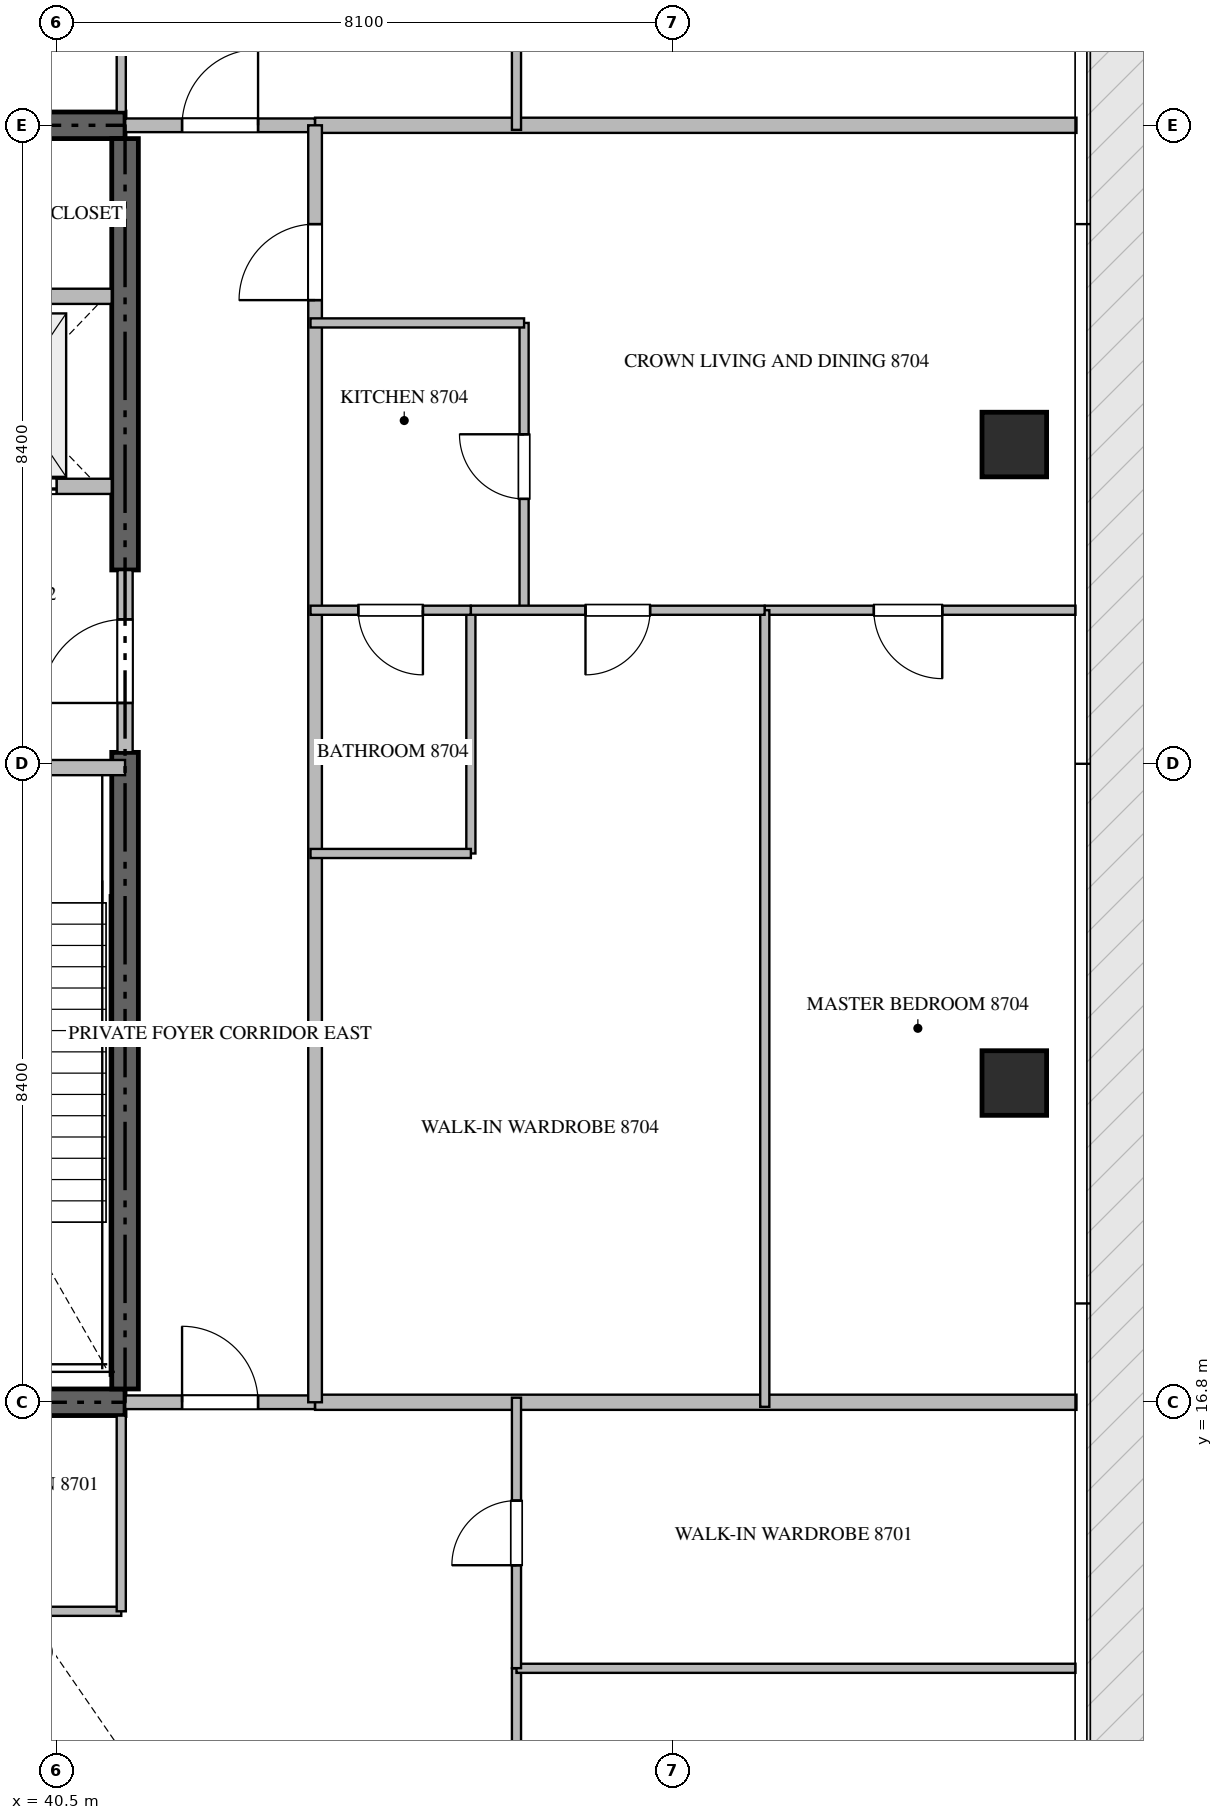
"""IFC4 building model, lengths in metres.
Left out: names, types, materials, properties, quantities, classifications, styles, units other than length and angle.
Written with IfcOpenShell. Run it as: python <this file> out.ifc"""

import sys

from ifc_helpers import new_model, si_unit, direction, frame, frame_2d, origin, origin_2d, place, context, subcontext, project, spatial, rectangle, extrude, source, transform, mapped, element, fill, save


model = new_model("IFC4")
c1 = context("Model", 3, precision=1e-05, world=origin(), true_north=direction((0.0, 1.0)))
c2 = subcontext(c1, "Body", "Model", "MODEL_VIEW")
j1 = project(units=[si_unit("LENGTHUNIT", "METRE"), si_unit("PLANEANGLEUNIT", "RADIAN")], contexts=[c1])
p1 = place(None, origin())
s1 = spatial("IfcSite", under=j1, at=p1, CompositionType="ELEMENT")
p2 = place(p1, origin())
s2 = spatial("IfcBuilding", under=s1, at=p2, CompositionType="ELEMENT")
p3 = place(p2, frame((0.0, 0.0, 353.85)))
s3 = spatial("IfcBuildingStorey", under=s2, at=p3, CompositionType="ELEMENT", Elevation=353.85)
for number, where, z_axis, x_axis in (
    (1, (23.4, 16.8, -0.26), (0.0, 0.0, 1.0), (1.0, 0.0, 0.0)),
    (2, (41.4, 33.6, -0.26), (0.0, 0.0, 1.0), (-1.0, 0.0, 0.0)),
):
    element("IfcWall", number, at=place(p3, frame(where, z_axis=z_axis, x_axis=x_axis)), inside=s3, PredefinedType="SHEAR", context=c2, shape_type="SweptSolid", body=[
        extrude(rectangle(XDim=18.0, YDim=0.35, at=frame_2d((9.0, 0.0))), origin(), (0.0, 0.0, 1.0), 5.798),
    ])
p4 = place(p3, frame((41.4, 16.975, -0.26), z_axis=(0.0, 0.0, 1.0), x_axis=(0.0, 1.0, 0.0)))
e3 = element("IfcWall", 3, at=p4, inside=s3, PredefinedType="SHEAR", context=c2, shape_type="SweptSolid", body=[
    extrude(rectangle(XDim=8.375, YDim=0.35, at=frame_2d((4.188, 0.0))), origin(), (0.0, 0.0, 1.0), 5.798),
])
p5 = place(p3, frame((41.4, 27.75, -0.26), z_axis=(0.0, 0.0, 1.0), x_axis=(0.0, 1.0, 0.0)))
e4 = element("IfcWall", 4, at=p5, inside=s3, PredefinedType="SHEAR", context=c2, shape_type="SweptSolid", body=[
    extrude(rectangle(XDim=5.675, YDim=0.35, at=frame_2d((2.837, 0.0))), origin(), (0.0, 0.0, 1.0), 5.798),
])
m1 = source(origin(), c2, "Body", "SweptSolid", [
    extrude(rectangle(XDim=0.85, YDim=0.85, at=origin_2d()), origin(), (0.0, 0.0, 1.0), 5.8),
])
for number, where, z_axis, x_axis in (
    (5, (53.1, 21.0, -0.26), (0.0, 0.0, 1.0), (1.0, 0.0, 0.0)),
    (6, (53.1, 29.4, -0.26), (0.0, 0.0, 1.0), (1.0, 0.0, 0.0)),
):
    element("IfcColumn", number, at=place(p3, frame(where, z_axis=z_axis, x_axis=x_axis)), inside=s3, PredefinedType="COLUMN", context=c2, shape_type="MappedRepresentation", body=[
        mapped(m1, transform((0.0, 0.0, 0.0), scale=1.0)),
    ])
p6 = place(p3, frame((36.95, 25.15, 0.0), z_axis=(0.0, 0.0, 1.0), x_axis=(1.0, 0.0, 0.0)))
e7 = element("IfcWall", 7, at=p6, inside=s3, PredefinedType="STANDARD", context=c2, shape_type="SweptSolid", body=[
    extrude(rectangle(XDim=4.45, YDim=0.2, at=frame_2d((2.225, 0.0))), origin(), (0.0, 0.0, 1.0), 5.54),
])
p7 = place(p6, frame((1.65, 0.0, 0.0)))
e8 = element("IfcOpeningElement", 8, at=p7, cuts=e7, PredefinedType="OPENING", context=c2, shape_type="SweptSolid", body=[
    extrude(rectangle(XDim=1.1, YDim=2.15, at=frame_2d((0.55, 1.075))), frame((0.0, 0.11, 0.0), z_axis=(0.0, -1.0, 0.0), x_axis=(1.0, 0.0, 0.0)), (0.0, 0.0, 1.0), 0.22),
])
p8 = place(p3, frame((38.75, 28.85, 0.0), z_axis=(0.0, 0.0, 1.0), x_axis=(1.0, 0.0, 0.0)))
e9 = element("IfcWall", 9, at=p8, inside=s3, PredefinedType="STANDARD", context=c2, shape_type="SweptSolid", body=[
    extrude(rectangle(XDim=2.475, YDim=0.2, at=frame_2d((1.238, 0.0))), origin(), (0.0, 0.0, 1.0), 5.54),
])
p9 = place(p8, frame((0.55, 0.0, 0.0)))
e10 = element("IfcOpeningElement", 10, at=p9, cuts=e9, PredefinedType="OPENING", context=c2, shape_type="SweptSolid", body=[
    extrude(rectangle(XDim=1.2, YDim=2.2, at=frame_2d((0.6, 1.1))), frame((0.0, 0.11, 0.0), z_axis=(0.0, -1.0, 0.0), x_axis=(1.0, 0.0, 0.0)), (0.0, 0.0, 1.0), 0.22),
])
p10 = place(p3, frame((38.75, 31.35, 0.0), z_axis=(0.0, 0.0, 1.0), x_axis=(1.0, 0.0, 0.0)))
e11 = element("IfcWall", 11, at=p10, inside=s3, PredefinedType="STANDARD", context=c2, shape_type="SweptSolid", body=[
    extrude(rectangle(XDim=2.475, YDim=0.2, at=frame_2d((1.238, 0.0))), origin(), (0.0, 0.0, 1.0), 5.54),
])
p11 = place(p3, frame((41.4, 25.352, 0.0), z_axis=(0.0, 0.0, 1.0), x_axis=(0.0, 1.0, 0.0)))
e12 = element("IfcWall", 12, at=p11, inside=s3, PredefinedType="STANDARD", context=c2, shape_type="SweptSolid", body=[
    extrude(rectangle(XDim=2.396, YDim=0.2, at=frame_2d((1.198, 0.0))), origin(), (0.0, 0.0, 1.0), 5.54),
])
p12 = place(p11, frame((0.648, 0.0, 0.0)))
e13 = element("IfcOpeningElement", 13, at=p12, cuts=e12, PredefinedType="OPENING", context=c2, shape_type="SweptSolid", body=[
    extrude(rectangle(XDim=1.1, YDim=2.15, at=frame_2d((0.55, 1.075))), frame((0.0, 0.11, 0.0), z_axis=(0.0, -1.0, 0.0), x_axis=(1.0, 0.0, 0.0)), (0.0, 0.0, 1.0), 0.22),
])
for number, where, z_axis, x_axis in (
    (14, (43.9, 16.8, 0.0), (0.0, 0.0, 1.0), (1.0, 0.0, 0.0)),
    (15, (43.9, 33.6, 0.0), (0.0, 0.0, 1.0), (1.0, 0.0, 0.0)),
):
    element("IfcWall", number, at=place(p3, frame(where, z_axis=z_axis, x_axis=x_axis)), inside=s3, PredefinedType="PARTITIONING", context=c2, shape_type="SweptSolid", body=[
        extrude(rectangle(XDim=10.018, YDim=0.2, at=frame_2d((5.009, 0.0))), origin(), (0.0, 0.0, 1.0), 5.54),
    ])
p13 = place(p3, frame((41.402, 16.8, 0.0), z_axis=(0.0, 0.0, 1.0), x_axis=(1.0, 0.0, 0.0)))
e16 = element("IfcWall", 16, at=p13, inside=s3, PredefinedType="PARTITIONING", context=c2, shape_type="SweptSolid", body=[
    extrude(rectangle(XDim=2.496, YDim=0.18, at=frame_2d((1.248, 0.0))), origin(), (0.0, 0.0, 1.0), 5.54),
])
p14 = place(p13, frame((0.748, 0.0, 0.0)))
e17 = element("IfcOpeningElement", 17, at=p14, cuts=e16, PredefinedType="OPENING", context=c2, shape_type="SweptSolid", body=[
    extrude(rectangle(XDim=1.0, YDim=2.15, at=frame_2d((0.5, 1.075))), frame((0.0, 0.1, 0.0), z_axis=(0.0, -1.0, 0.0), x_axis=(1.0, 0.0, 0.0)), (0.0, 0.0, 1.0), 0.2),
])
p15 = place(p3, frame((41.402, 33.6, 0.0), z_axis=(0.0, 0.0, 1.0), x_axis=(1.0, 0.0, 0.0)))
e18 = element("IfcWall", 18, at=p15, inside=s3, PredefinedType="PARTITIONING", context=c2, shape_type="SweptSolid", body=[
    extrude(rectangle(XDim=2.496, YDim=0.18, at=frame_2d((1.248, 0.0))), origin(), (0.0, 0.0, 1.0), 5.54),
])
p16 = place(p15, frame((0.748, 0.0, 0.0)))
e19 = element("IfcOpeningElement", 19, at=p16, cuts=e18, PredefinedType="OPENING", context=c2, shape_type="SweptSolid", body=[
    extrude(rectangle(XDim=1.0, YDim=2.15, at=frame_2d((0.5, 1.075))), frame((0.0, 0.1, 0.0), z_axis=(0.0, -1.0, 0.0), x_axis=(1.0, 0.0, 0.0)), (0.0, 0.0, 1.0), 0.2),
])
p17 = place(p3, frame((43.9, 16.8, 0.0), z_axis=(0.0, 0.0, 1.0), x_axis=(0.0, 1.0, 0.0)))
e20 = element("IfcWall", 20, at=p17, inside=s3, PredefinedType="PARTITIONING", context=c2, shape_type="SweptSolid", body=[
    extrude(rectangle(XDim=16.8, YDim=0.18, at=frame_2d((8.4, 0.0))), origin(), (0.0, 0.0, 1.0), 5.54),
])
p18 = place(p17, frame((14.5, 0.0, 0.0)))
e21 = element("IfcOpeningElement", 21, at=p18, cuts=e20, PredefinedType="OPENING", context=c2, shape_type="SweptSolid", body=[
    extrude(rectangle(XDim=1.0, YDim=2.15, at=frame_2d((0.5, 1.075))), frame((0.0, 0.1, 0.0), z_axis=(0.0, -1.0, 0.0), x_axis=(1.0, 0.0, 0.0)), (0.0, 0.0, 1.0), 0.2),
])
p19 = place(p3, frame((38.5, 14.05, 0.0), z_axis=(0.0, 0.0, 1.0), x_axis=(1.0, 0.0, 0.0)))
e22 = element("IfcWall", 22, at=p19, inside=s3, PredefinedType="PARTITIONING", context=c2, shape_type="SweptSolid", body=[
    extrude(rectangle(XDim=2.85, YDim=0.12, at=frame_2d((1.425, 0.0))), origin(), (0.0, 0.0, 1.0), 5.54),
])
p20 = place(p19, frame((1.0, 0.0, 0.0)))
e23 = element("IfcOpeningElement", 23, at=p20, cuts=e22, PredefinedType="OPENING", context=c2, shape_type="SweptSolid", body=[
    extrude(rectangle(XDim=0.85, YDim=2.1, at=frame_2d((0.425, 1.05))), frame((0.0, 0.07, 0.0), z_axis=(0.0, -1.0, 0.0), x_axis=(1.0, 0.0, 0.0)), (0.0, 0.0, 1.0), 0.14),
])
p21 = place(p3, frame((41.35, 14.05, 0.0), z_axis=(0.0, 0.0, 1.0), x_axis=(0.0, 1.0, 0.0)))
e24 = element("IfcWall", 24, at=p21, inside=s3, PredefinedType="PARTITIONING", context=c2, shape_type="SweptSolid", body=[
    extrude(rectangle(XDim=2.575, YDim=0.12, at=frame_2d((1.288, 0.0))), origin(), (0.0, 0.0, 1.0), 5.54),
])
p22 = place(p3, frame((46.55, 4.095, 0.0), z_axis=(0.0, 0.0, 1.0), x_axis=(0.0, 1.0, 0.0)))
e25 = element("IfcWall", 25, at=p22, inside=s3, PredefinedType="PARTITIONING", context=c2, shape_type="SweptSolid", body=[
    extrude(rectangle(XDim=9.205, YDim=0.12, at=frame_2d((4.603, 0.0))), origin(), (0.0, 0.0, 1.0), 5.54),
])
p23 = place(p22, frame((4.568, 0.0, 0.0)))
e26 = element("IfcOpeningElement", 26, at=p23, cuts=e25, PredefinedType="OPENING", context=c2, shape_type="SweptSolid", body=[
    extrude(rectangle(XDim=0.9, YDim=2.1, at=frame_2d((0.45, 1.05))), frame((0.0, 0.07, 0.0), z_axis=(0.0, -1.0, 0.0), x_axis=(1.0, 0.0, 0.0)), (0.0, 0.0, 1.0), 0.14),
])
p24 = place(p3, frame((46.55, 13.3, 0.0), z_axis=(0.0, 0.0, 1.0), x_axis=(1.0, 0.0, 0.0)))
e27 = element("IfcWall", 27, at=p24, inside=s3, PredefinedType="PARTITIONING", context=c2, shape_type="SweptSolid", body=[
    extrude(rectangle(XDim=7.355, YDim=0.12, at=frame_2d((3.677, 0.0))), origin(), (0.0, 0.0, 1.0), 5.54),
])
p25 = place(p3, frame((46.55, 13.302, 0.0), z_axis=(0.0, 0.0, 1.0), x_axis=(0.0, 1.0, 0.0)))
e28 = element("IfcWall", 28, at=p25, inside=s3, PredefinedType="PARTITIONING", context=c2, shape_type="SweptSolid", body=[
    extrude(rectangle(XDim=3.558, YDim=0.12, at=frame_2d((1.779, 0.0))), origin(), (0.0, 0.0, 1.0), 5.54),
])
p26 = place(p25, frame((1.354, 0.0, 0.0)))
e29 = element("IfcOpeningElement", 29, at=p26, cuts=e28, PredefinedType="OPENING", context=c2, shape_type="SweptSolid", body=[
    extrude(rectangle(XDim=0.85, YDim=2.1, at=frame_2d((0.425, 1.05))), frame((0.0, 0.07, 0.0), z_axis=(0.0, -1.0, 0.0), x_axis=(1.0, 0.0, 0.0)), (0.0, 0.0, 1.0), 0.14),
])
p27 = place(p3, frame((41.35, 36.35, 0.0), z_axis=(0.0, 0.0, 1.0), x_axis=(0.0, -1.0, 0.0)))
e30 = element("IfcWall", 30, at=p27, inside=s3, PredefinedType="PARTITIONING", context=c2, shape_type="SweptSolid", body=[
    extrude(rectangle(XDim=2.575, YDim=0.12, at=frame_2d((1.288, 0.0))), origin(), (0.0, 0.0, 1.0), 5.54),
])
p28 = place(p3, frame((46.55, 37.098, 0.0), z_axis=(0.0, 0.0, 1.0), x_axis=(0.0, -1.0, 0.0)))
e31 = element("IfcWall", 31, at=p28, inside=s3, PredefinedType="PARTITIONING", context=c2, shape_type="SweptSolid", body=[
    extrude(rectangle(XDim=3.558, YDim=0.12, at=frame_2d((1.779, 0.0))), origin(), (0.0, 0.0, 1.0), 5.54),
])
p29 = place(p28, frame((1.354, 0.0, 0.0)))
e32 = element("IfcOpeningElement", 32, at=p29, cuts=e31, PredefinedType="OPENING", context=c2, shape_type="SweptSolid", body=[
    extrude(rectangle(XDim=0.85, YDim=2.1, at=frame_2d((0.425, 1.05))), frame((0.0, 0.07, 0.0), z_axis=(0.0, -1.0, 0.0), x_axis=(1.0, 0.0, 0.0)), (0.0, 0.0, 1.0), 0.14),
])
p30 = place(p3, frame((46.65, 27.22, 0.0), z_axis=(0.0, 0.0, 1.0), x_axis=(0.0, 1.0, 0.0)))
e33 = element("IfcWall", 33, at=p30, inside=s3, PredefinedType="PARTITIONING", context=c2, shape_type="SweptSolid", body=[
    extrude(rectangle(XDim=3.78, YDim=0.12, at=frame_2d((1.89, 0.0))), origin(), (0.0, 0.0, 1.0), 5.54),
])
p31 = place(p30, frame((1.465, 0.0, 0.0)))
e34 = element("IfcOpeningElement", 34, at=p31, cuts=e33, PredefinedType="OPENING", context=c2, shape_type="SweptSolid", body=[
    extrude(rectangle(XDim=0.85, YDim=2.1, at=frame_2d((0.425, 1.05))), frame((0.0, 0.07, 0.0), z_axis=(0.0, -1.0, 0.0), x_axis=(1.0, 0.0, 0.0)), (0.0, 0.0, 1.0), 0.14),
])
p32 = place(p3, frame((46.65, 31.0, 0.0), z_axis=(0.0, 0.0, 1.0), x_axis=(-1.0, 0.0, 0.0)))
e35 = element("IfcWall", 35, at=p32, inside=s3, PredefinedType="PARTITIONING", context=c2, shape_type="SweptSolid", body=[
    extrude(rectangle(XDim=2.81, YDim=0.12, at=frame_2d((1.405, 0.0))), origin(), (0.0, 0.0, 1.0), 5.54),
])
p33 = place(p3, frame((53.905, 27.22, 0.0), z_axis=(0.0, 0.0, 1.0), x_axis=(-1.0, 0.0, 0.0)))
e36 = element("IfcWall", 36, at=p33, inside=s3, PredefinedType="PARTITIONING", context=c2, shape_type="SweptSolid", body=[
    extrude(rectangle(XDim=4.088, YDim=0.12, at=frame_2d((2.044, 0.0))), origin(), (0.0, 0.0, 1.0), 5.54),
])
p34 = place(p33, frame((1.753, 0.0, 0.0)))
e37 = element("IfcOpeningElement", 37, at=p34, cuts=e36, PredefinedType="OPENING", context=c2, shape_type="SweptSolid", body=[
    extrude(rectangle(XDim=0.9, YDim=2.1, at=frame_2d((0.45, 1.05))), frame((0.0, 0.07, 0.0), z_axis=(0.0, -1.0, 0.0), x_axis=(1.0, 0.0, 0.0)), (0.0, 0.0, 1.0), 0.14),
])
p35 = place(p3, frame((49.817, 16.74, 0.0), z_axis=(0.0, 0.0, 1.0), x_axis=(0.0, 1.0, 0.0)))
e38 = element("IfcWall", 38, at=p35, inside=s3, PredefinedType="PARTITIONING", context=c2, shape_type="SweptSolid", body=[
    extrude(rectangle(XDim=10.48, YDim=0.12, at=frame_2d((5.24, 0.0))), origin(), (0.0, 0.0, 1.0), 5.54),
])
p36 = place(p3, frame((45.95, 24.02, 0.0), z_axis=(0.0, 0.0, 1.0), x_axis=(0.0, 1.0, 0.0)))
e39 = element("IfcWall", 39, at=p36, inside=s3, PredefinedType="PARTITIONING", context=c2, shape_type="SweptSolid", body=[
    extrude(rectangle(XDim=3.2, YDim=0.12, at=frame_2d((1.6, 0.0))), origin(), (0.0, 0.0, 1.0), 5.54),
])
p37 = place(p3, frame((45.95, 24.02, 0.0), z_axis=(0.0, 0.0, 1.0), x_axis=(-1.0, 0.0, 0.0)))
e40 = element("IfcWall", 40, at=p37, inside=s3, PredefinedType="PARTITIONING", context=c2, shape_type="SweptSolid", body=[
    extrude(rectangle(XDim=2.11, YDim=0.12, at=frame_2d((1.055, 0.0))), origin(), (0.0, 0.0, 1.0), 5.54),
])
p38 = place(p3, frame((49.815, 27.22, 0.0), z_axis=(0.0, 0.0, 1.0), x_axis=(-1.0, 0.0, 0.0)))
e41 = element("IfcWall", 41, at=p38, inside=s3, PredefinedType="PARTITIONING", context=c2, shape_type="SweptSolid", body=[
    extrude(rectangle(XDim=3.865, YDim=0.12, at=frame_2d((1.933, 0.0))), origin(), (0.0, 0.0, 1.0), 5.54),
])
p39 = place(p38, frame((1.507, 0.0, 0.0)))
e42 = element("IfcOpeningElement", 42, at=p39, cuts=e41, PredefinedType="OPENING", context=c2, shape_type="SweptSolid", body=[
    extrude(rectangle(XDim=0.85, YDim=2.1, at=frame_2d((0.425, 1.05))), frame((0.0, 0.07, 0.0), z_axis=(0.0, -1.0, 0.0), x_axis=(1.0, 0.0, 0.0)), (0.0, 0.0, 1.0), 0.14),
])
p40 = place(p3, frame((45.948, 27.22, 0.0), z_axis=(0.0, 0.0, 1.0), x_axis=(-1.0, 0.0, 0.0)))
e43 = element("IfcWall", 43, at=p40, inside=s3, PredefinedType="PARTITIONING", context=c2, shape_type="SweptSolid", body=[
    extrude(rectangle(XDim=2.108, YDim=0.12, at=frame_2d((1.054, 0.0))), origin(), (0.0, 0.0, 1.0), 5.54),
])
p41 = place(p40, frame((0.629, 0.0, 0.0)))
e44 = element("IfcOpeningElement", 44, at=p41, cuts=e43, PredefinedType="OPENING", context=c2, shape_type="SweptSolid", body=[
    extrude(rectangle(XDim=0.85, YDim=2.1, at=frame_2d((0.425, 1.05))), frame((0.0, 0.07, 0.0), z_axis=(0.0, -1.0, 0.0), x_axis=(1.0, 0.0, 0.0)), (0.0, 0.0, 1.0), 0.14),
])
m2 = source(origin(), c2, "Body", "SweptSolid", [
    extrude(rectangle(XDim=1.2, YDim=2.2, at=frame_2d((0.6, 1.1))), frame((0.0, 0.025, 0.0), z_axis=(0.0, -1.0, 0.0), x_axis=(1.0, 0.0, 0.0)), (0.0, 0.0, 1.0), 0.05),
])
p42 = place(p9, origin())
e45 = element("IfcDoor", 45, at=p42, inside=s3, OperationType="DOUBLE_DOOR_SLIDING", PredefinedType="DOOR", context=c2, shape_type="MappedRepresentation", body=[
    mapped(m2, transform((0.0, 0.0, 0.0), scale=1.0)),
])
fill(e10, e45)
m3 = source(origin(), c2, "Body", "SweptSolid", [
    extrude(rectangle(XDim=1.1, YDim=2.15, at=frame_2d((0.55, 1.075))), frame((0.0, 0.025, 0.0), z_axis=(0.0, -1.0, 0.0), x_axis=(1.0, 0.0, 0.0)), (0.0, 0.0, 1.0), 0.05),
])
p43 = place(p12, origin())
e46 = element("IfcDoor", 46, at=p43, inside=s3, OperationType="SINGLE_SWING_LEFT", PredefinedType="DOOR", context=c2, shape_type="MappedRepresentation", body=[
    mapped(m3, transform((0.0, 0.0, 0.0), scale=1.0)),
])
fill(e13, e46)
m4 = source(origin(), c2, "Body", "SweptSolid", [
    extrude(rectangle(XDim=1.0, YDim=2.15, at=frame_2d((0.5, 1.075))), frame((0.0, 0.025, 0.0), z_axis=(0.0, -1.0, 0.0), x_axis=(1.0, 0.0, 0.0)), (0.0, 0.0, 1.0), 0.05),
])
p44 = place(p14, origin())
e47 = element("IfcDoor", 47, at=p44, inside=s3, OperationType="SINGLE_SWING_LEFT", PredefinedType="DOOR", context=c2, shape_type="MappedRepresentation", body=[
    mapped(m4, transform((0.0, 0.0, 0.0), scale=1.0)),
])
fill(e17, e47)
p45 = place(p16, origin())
e48 = element("IfcDoor", 48, at=p45, inside=s3, OperationType="SINGLE_SWING_RIGHT", PredefinedType="DOOR", context=c2, shape_type="MappedRepresentation", body=[
    mapped(m4, transform((0.0, 0.0, 0.0), scale=1.0)),
])
fill(e19, e48)
p46 = place(p18, origin())
e49 = element("IfcDoor", 49, at=p46, inside=s3, OperationType="SINGLE_SWING_LEFT", PredefinedType="DOOR", context=c2, shape_type="MappedRepresentation", body=[
    mapped(m4, transform((0.0, 0.0, 0.0), scale=1.0)),
])
fill(e21, e49)
m5 = source(origin(), c2, "Body", "SweptSolid", [
    extrude(rectangle(XDim=0.85, YDim=2.1, at=frame_2d((0.425, 1.05))), frame((0.0, 0.025, 0.0), z_axis=(0.0, -1.0, 0.0), x_axis=(1.0, 0.0, 0.0)), (0.0, 0.0, 1.0), 0.05),
])
p47 = place(p26, origin())
e50 = element("IfcDoor", 50, at=p47, inside=s3, OperationType="SINGLE_SWING_LEFT", PredefinedType="DOOR", context=c2, shape_type="MappedRepresentation", body=[
    mapped(m5, transform((0.0, 0.0, 0.0), scale=1.0)),
])
fill(e29, e50)
p48 = place(p31, origin())
e51 = element("IfcDoor", 51, at=p48, inside=s3, OperationType="SINGLE_SWING_RIGHT", PredefinedType="DOOR", context=c2, shape_type="MappedRepresentation", body=[
    mapped(m5, transform((0.0, 0.0, 0.0), scale=1.0)),
])
fill(e34, e51)
m6 = source(origin(), c2, "Body", "SweptSolid", [
    extrude(rectangle(XDim=0.9, YDim=2.1, at=frame_2d((0.45, 1.05))), frame((0.0, 0.025, 0.0), z_axis=(0.0, -1.0, 0.0), x_axis=(1.0, 0.0, 0.0)), (0.0, 0.0, 1.0), 0.05),
])
p49 = place(p34, origin())
e52 = element("IfcDoor", 52, at=p49, inside=s3, OperationType="SINGLE_SWING_LEFT", PredefinedType="DOOR", context=c2, shape_type="MappedRepresentation", body=[
    mapped(m6, transform((0.0, 0.0, 0.0), scale=1.0)),
])
fill(e37, e52)
p50 = place(p39, origin())
e53 = element("IfcDoor", 53, at=p50, inside=s3, OperationType="SINGLE_SWING_RIGHT", PredefinedType="DOOR", context=c2, shape_type="MappedRepresentation", body=[
    mapped(m5, transform((0.0, 0.0, 0.0), scale=1.0)),
])
fill(e42, e53)
p51 = place(p41, origin())
e54 = element("IfcDoor", 54, at=p51, inside=s3, OperationType="SINGLE_SWING_LEFT", PredefinedType="DOOR", context=c2, shape_type="MappedRepresentation", body=[
    mapped(m5, transform((0.0, 0.0, 0.0), scale=1.0)),
])
fill(e44, e54)
save(model, sys.argv[1])
